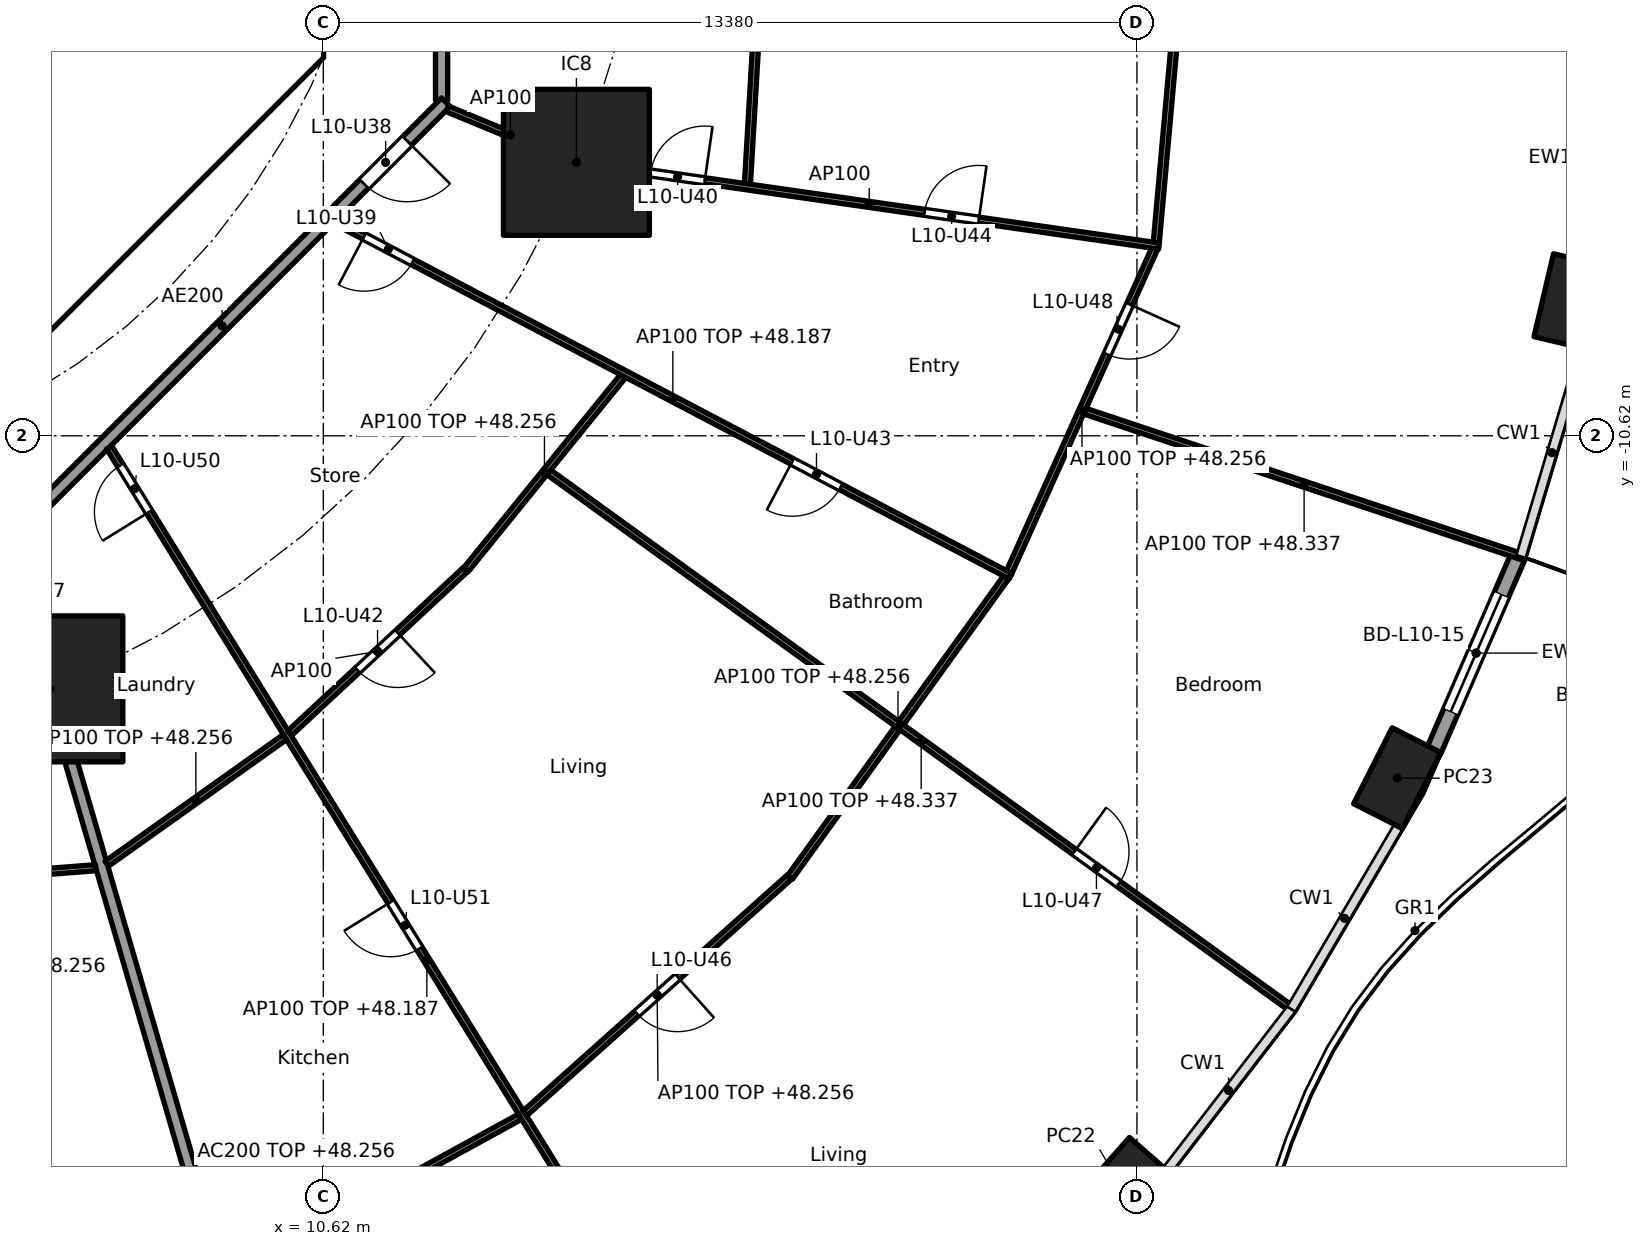
"""IFC4 building model, lengths in metres.
Left out: names, types, materials, properties, quantities, classifications, styles, units other than length and angle.
Written with IfcOpenShell. Run it as: python <this file> out.ifc"""

import sys

from ifc_helpers import new_model, si_unit, direction, frame, frame_2d, origin, origin_2d, place, context, subcontext, project, spatial, polyline, rectangle, hollow_rectangle, outline, extrude, element, fill, save


model = new_model("IFC4")
c1 = context("Model", 3, precision=1e-05, world=origin(), true_north=direction((0.0, 1.0)))
c2 = subcontext(c1, "Body", "Model", "MODEL_VIEW")
j1 = project(units=[si_unit("LENGTHUNIT", "METRE"), si_unit("PLANEANGLEUNIT", "RADIAN")], contexts=[c1])
p1 = place(None, origin())
s1 = spatial("IfcSite", under=j1, at=p1, CompositionType="ELEMENT")
p2 = place(p1, origin())
s2 = spatial("IfcBuilding", under=s1, at=p2, CompositionType="ELEMENT")
p3 = place(p2, frame((0.0, 0.0, 45.5)))
s3 = spatial("IfcBuildingStorey", under=s2, at=p3, CompositionType="ELEMENT", Elevation=45.5)
for number, where, z_axis, x_axis in (
    (1, (23.752, -22.981, 0.0), (0.0, 0.0, 1.0), (0.66, 0.751, 0.0)),
    (2, (28.282, -16.25, 0.0), (0.0, 0.0, 1.0), (0.452, 0.892, 0.0)),
    (3, (31.129, -8.412, 0.0), (0.0, 0.0, 1.0), (0.229, 0.973, 0.0)),
):
    element("IfcColumn", number, at=place(p3, frame(where, z_axis=z_axis, x_axis=x_axis)), inside=s3, PredefinedType="COLUMN", context=c2, shape_type="SweptSolid", body=[
        extrude(hollow_rectangle(XDim=1.4, YDim=0.9, WallThickness=0.05, at=origin_2d()), origin(), (0.0, 0.0, 1.0), 3.7),
    ])
for number, where, z_axis, x_axis in (
    (4, (6.123, -14.782, 0.0), (0.0, 0.0, 1.0), (1.0, 0.0, 0.0)),
    (5, (14.782, -6.123, 0.0), (0.0, 0.0, 1.0), (1.0, 0.0, 0.0)),
):
    element("IfcColumn", number, at=place(p3, frame(where, z_axis=z_axis, x_axis=x_axis)), inside=s3, PredefinedType="COLUMN", context=c2, shape_type="SweptSolid", body=[
        extrude(rectangle(XDim=2.4, YDim=2.4, at=origin_2d()), origin(), (0.0, 0.0, 1.0), 3.7),
    ])
p4 = place(p3, frame((30.278, -12.579, 0.0), z_axis=(0.0, 0.0, 1.0), x_axis=(-0.397624958345, -0.917548032803, 0.0)))
e6 = element("IfcWall", 6, at=p4, inside=s3, PredefinedType="SOLIDWALL", context=c2, shape_type="SweptSolid", body=[
    extrude(rectangle(XDim=3.52, YDim=0.25, at=frame_2d((1.76, 0.0))), origin(), (0.0, 0.0, 1.0), 3.44),
])
p5 = place(p4, frame((0.71, 0.0, 0.0)))
e7 = element("IfcOpeningElement", 7, at=p5, cuts=e6, PredefinedType="OPENING", context=c2, shape_type="SweptSolid", body=[
    extrude(rectangle(XDim=2.1, YDim=2.4, at=frame_2d((1.05, 1.2))), frame((0.0, 0.135, 0.0), z_axis=(0.0, -1.0, 0.0), x_axis=(1.0, 0.0, 0.0)), (0.0, 0.0, 1.0), 0.27),
])
p6 = place(p3, frame((4.613, -9.988, 0.0), z_axis=(0.0, 0.0, 1.0), x_axis=(0.707106781187, 0.707106781187, 0.0)))
e8 = element("IfcWall", 8, at=p6, inside=s3, PredefinedType="SHEAR", context=c2, shape_type="SweptSolid", body=[
    extrude(rectangle(XDim=7.602, YDim=0.6, at=frame_2d((3.801, 0.0))), origin(), (0.0, 0.0, 1.0), 3.44),
])
p7 = place(p6, frame((3.201, 0.0, 0.0)))
e9 = element("IfcOpeningElement", 9, at=p7, cuts=e8, PredefinedType="OPENING", context=c2, shape_type="SweptSolid", body=[
    extrude(rectangle(XDim=1.2, YDim=2.1, at=frame_2d((0.6, 1.05))), frame((0.0, 0.31, 0.0), z_axis=(0.0, -1.0, 0.0), x_axis=(1.0, 0.0, 0.0)), (0.0, 0.0, 1.0), 0.62),
])
p8 = place(p3, origin())
e10 = element("IfcWall", 10, at=p8, inside=s3, PredefinedType="SHEAR", context=c2, shape_type="SweptSolid", body=[
    extrude(outline(polyline([(9.776, -4.401), (10.025, -4.152), (10.025, -3.801), (10.025, 4.152), (9.776, 4.401), (10.2, 4.825), (10.625, 4.401), (10.625, -4.401), (10.2, -4.825), (9.776, -4.401)])), origin(), (0.0, 0.0, 1.0), 3.44),
])
p9 = place(p3, frame((5.243, -12.657, 0.0), z_axis=(0.0, 0.0, 1.0), x_axis=(0.382707856524, -0.923869415315, 0.0)))
e11 = element("IfcWall", 11, at=p9, inside=s3, PredefinedType="PARTITIONING", context=c2, shape_type="SweptSolid", body=[
    extrude(rectangle(XDim=2.2, YDim=0.2, at=frame_2d((1.1, 0.0))), origin(), (0.0, 0.0, 1.0), 3.44),
])
p10 = place(p3, frame((6.137, -14.83, 0.0), z_axis=(0.0, 0.0, 1.0), x_axis=(0.27985745069, -0.960041565399, 0.0)))
e12 = element("IfcWall", 12, at=p10, inside=s3, PredefinedType="PARTITIONING", context=c2, shape_type="SweptSolid", body=[
    extrude(rectangle(XDim=16.705, YDim=0.2, at=frame_2d((8.353, 0.0))), origin(), (0.0, 0.0, 1.0), 2.756),
])
p11 = place(p3, frame((12.565, -5.104, 0.0), z_axis=(0.0, 0.0, 1.0), x_axis=(0.0, 1.0, 0.0)))
e13 = element("IfcWall", 13, at=p11, inside=s3, PredefinedType="PARTITIONING", context=c2, shape_type="SweptSolid", body=[
    extrude(rectangle(XDim=10.209, YDim=0.2, at=frame_2d((5.104, 0.0))), origin(), (0.0, 0.0, 1.0), 3.44),
])
p12 = place(p3, frame((5.275, -12.494, 0.0), z_axis=(0.0, 0.0, 1.0), x_axis=(0.707106781187, 0.707106781187, 0.0)))
e14 = element("IfcWall", 14, at=p12, inside=s3, PredefinedType="PARTITIONING", context=c2, shape_type="SweptSolid", body=[
    extrude(rectangle(XDim=10.409, YDim=0.2, at=frame_2d((5.205, 0.0))), origin(), (0.0, 0.0, 1.0), 3.44),
])
p13 = place(p12, frame((8.508, 0.0, 0.0)))
e15 = element("IfcOpeningElement", 15, at=p13, cuts=e14, PredefinedType="OPENING", context=c2, shape_type="SweptSolid", body=[
    extrude(rectangle(XDim=1.0, YDim=2.1, at=frame_2d((0.5, 1.05))), frame((0.0, 0.11, 0.0), z_axis=(0.0, -1.0, 0.0), x_axis=(1.0, 0.0, 0.0)), (0.0, 0.0, 1.0), 0.22),
])
p14 = place(p3, frame((17.971, -0.05, 0.0), z_axis=(0.0, 0.0, 1.0), x_axis=(-0.058475267553, -0.998288857538, 0.0)))
e16 = element("IfcWall", 16, at=p14, inside=s3, PredefinedType="PARTITIONING", context=c2, shape_type="SweptSolid", body=[
    extrude(rectangle(XDim=6.438, YDim=0.1, at=frame_2d((3.219, 0.0))), origin(), (0.0, 0.0, 1.0), 2.756),
])
p15 = place(p3, frame((24.982, -0.05, 0.0), z_axis=(0.0, 0.0, 1.0), x_axis=(-0.089432471274, -0.995992888068, 0.0)))
e17 = element("IfcWall", 17, at=p15, inside=s3, PredefinedType="PARTITIONING", context=c2, shape_type="SweptSolid", body=[
    extrude(rectangle(XDim=7.423, YDim=0.1, at=frame_2d((3.711, 0.0))), origin(), (0.0, 0.0, 1.0), 2.756),
])
p16 = place(p3, frame((2.288, -18.078, 0.0), z_axis=(0.0, 0.0, 1.0), x_axis=(0.99701850123, 0.077162868047, 0.0)))
e18 = element("IfcWall", 18, at=p16, inside=s3, PredefinedType="PARTITIONING", context=c2, shape_type="SweptSolid", body=[
    extrude(rectangle(XDim=4.604, YDim=0.1, at=frame_2d((2.302, 0.0))), origin(), (0.0, 0.0, 1.0), 2.756),
])
p17 = place(p16, frame((1.852, 0.0, 0.0)))
e19 = element("IfcOpeningElement", 19, at=p17, cuts=e18, PredefinedType="OPENING", context=c2, shape_type="SweptSolid", body=[
    extrude(rectangle(XDim=0.9, YDim=2.1, at=frame_2d((0.45, 1.05))), frame((0.0, 0.06, 0.0), z_axis=(0.0, -1.0, 0.0), x_axis=(1.0, 0.0, 0.0)), (0.0, 0.0, 1.0), 0.12),
])
p18 = place(p3, frame((7.06, -17.657, 0.0), z_axis=(0.0, 0.0, 1.0), x_axis=(0.81492039338, 0.57957290521, 0.0)))
e20 = element("IfcWall", 20, at=p18, inside=s3, PredefinedType="PARTITIONING", context=c2, shape_type="SweptSolid", body=[
    extrude(rectangle(XDim=3.594, YDim=0.1, at=frame_2d((1.797, 0.0))), origin(), (0.0, 0.0, 1.0), 2.756),
])
p19 = place(p3, frame((9.045, -24.456, 0.0), z_axis=(0.0, 0.0, 1.0), x_axis=(0.876809987787, 0.480837025734, 0.0)))
e21 = element("IfcWall", 21, at=p19, inside=s3, PredefinedType="PARTITIONING", context=c2, shape_type="SweptSolid", body=[
    extrude(rectangle(XDim=5.486, YDim=0.1, at=frame_2d((2.743, 0.0))), origin(), (0.0, 0.0, 1.0), 2.756),
])
p20 = place(p3, frame((7.097, -10.81, 0.0), z_axis=(0.0, 0.0, 1.0), x_axis=(0.526453266471, -0.850204068576, 0.0)))
e22 = element("IfcWall", 22, at=p20, inside=s3, PredefinedType="PARTITIONING", context=c2, shape_type="SweptSolid", body=[
    extrude(rectangle(XDim=19.85, YDim=0.1, at=frame_2d((9.925, 0.0))), origin(), (0.0, 0.0, 1.0), 2.687),
])
p21 = place(p20, frame((0.35, 0.0, 0.0)))
e23 = element("IfcOpeningElement", 23, at=p21, cuts=e22, PredefinedType="OPENING", context=c2, shape_type="SweptSolid", body=[
    extrude(rectangle(XDim=0.9, YDim=2.1, at=frame_2d((0.45, 1.05))), frame((0.0, 0.06, 0.0), z_axis=(0.0, -1.0, 0.0), x_axis=(1.0, 0.0, 0.0)), (0.0, 0.0, 1.0), 0.12),
])
p22 = place(p20, frame((8.795, 0.0, 0.0)))
e24 = element("IfcOpeningElement", 24, at=p22, cuts=e22, PredefinedType="OPENING", context=c2, shape_type="SweptSolid", body=[
    extrude(rectangle(XDim=0.9, YDim=2.1, at=frame_2d((0.45, 1.05))), frame((0.0, 0.06, 0.0), z_axis=(0.0, -1.0, 0.0), x_axis=(1.0, 0.0, 0.0)), (0.0, 0.0, 1.0), 0.12),
])
p23 = place(p20, frame((15.935, 0.0, 0.0)))
e25 = element("IfcOpeningElement", 25, at=p23, cuts=e22, PredefinedType="OPENING", context=c2, shape_type="SweptSolid", body=[
    extrude(rectangle(XDim=0.9, YDim=2.1, at=frame_2d((0.45, 1.05))), frame((0.0, 0.06, 0.0), z_axis=(0.0, -1.0, 0.0), x_axis=(1.0, 0.0, 0.0)), (0.0, 0.0, 1.0), 0.12),
])
p24 = place(p3, frame((10.066, -15.511, 0.0), z_axis=(0.0, 0.0, 1.0), x_axis=(0.732022571638, 0.681280378855, 0.0)))
e26 = element("IfcWall", 26, at=p24, inside=s3, PredefinedType="PARTITIONING", context=c2, shape_type="SweptSolid", body=[
    extrude(rectangle(XDim=3.95, YDim=0.1, at=frame_2d((1.975, 0.0))), origin(), (0.0, 0.0, 1.0), 3.44),
])
p25 = place(p24, frame((1.525, 0.0, 0.0)))
e27 = element("IfcOpeningElement", 27, at=p25, cuts=e26, PredefinedType="OPENING", context=c2, shape_type="SweptSolid", body=[
    extrude(rectangle(XDim=0.9, YDim=2.1, at=frame_2d((0.45, 1.05))), frame((0.0, 0.06, 0.0), z_axis=(0.0, -1.0, 0.0), x_axis=(1.0, 0.0, 0.0)), (0.0, 0.0, 1.0), 0.12),
])
p26 = place(p3, frame((13.936, -21.761, 0.0), z_axis=(0.0, 0.0, 1.0), x_axis=(0.745806142791, 0.666163041136, 0.0)))
e28 = element("IfcWall", 28, at=p26, inside=s3, PredefinedType="PARTITIONING", context=c2, shape_type="SweptSolid", body=[
    extrude(rectangle(XDim=5.831, YDim=0.1, at=frame_2d((2.915, 0.0))), origin(), (0.0, 0.0, 1.0), 2.756),
])
p27 = place(p26, frame((2.465, 0.0, 0.0)))
e29 = element("IfcOpeningElement", 29, at=p27, cuts=e28, PredefinedType="OPENING", context=c2, shape_type="SweptSolid", body=[
    extrude(rectangle(XDim=0.9, YDim=2.1, at=frame_2d((0.45, 1.05))), frame((0.0, 0.06, 0.0), z_axis=(0.0, -1.0, 0.0), x_axis=(1.0, 0.0, 0.0)), (0.0, 0.0, 1.0), 0.12),
])
p28 = place(p3, frame((12.963, -12.825, 0.0), z_axis=(0.0, 0.0, 1.0), x_axis=(0.63012473344, 0.776493928056, 0.0)))
e30 = element("IfcWall", 30, at=p28, inside=s3, PredefinedType="PARTITIONING", context=c2, shape_type="SweptSolid", body=[
    extrude(rectangle(XDim=4.106, YDim=0.1, at=frame_2d((2.053, 0.0))), origin(), (0.0, 0.0, 1.0), 2.756),
])
p29 = place(p3, frame((18.293, -17.884, 0.0), z_axis=(0.0, 0.0, 1.0), x_axis=(0.584558392935, 0.811351640936, 0.0)))
e31 = element("IfcWall", 31, at=p29, inside=s3, PredefinedType="PARTITIONING", context=c2, shape_type="SweptSolid", body=[
    extrude(rectangle(XDim=6.084, YDim=0.1, at=frame_2d((3.042, 0.0))), origin(), (0.0, 0.0, 1.0), 2.756),
])
p30 = place(p3, frame((14.329, -11.221, 0.0), z_axis=(0.0, 0.0, 1.0), x_axis=(0.810671130917, -0.58550176558, 0.0)))
e32 = element("IfcWall", 32, at=p30, inside=s3, PredefinedType="PARTITIONING", context=c2, shape_type="SweptSolid", body=[
    extrude(rectangle(XDim=15.106, YDim=0.1, at=frame_2d((7.553, 0.0))), origin(), (0.0, 0.0, 1.0), 2.837),
])
p31 = place(p30, frame((10.659, 0.0, 0.0)))
e33 = element("IfcOpeningElement", 33, at=p31, cuts=e32, PredefinedType="OPENING", context=c2, shape_type="SweptSolid", body=[
    extrude(rectangle(XDim=0.9, YDim=2.1, at=frame_2d((0.45, 1.05))), frame((0.0, 0.06, 0.0), z_axis=(0.0, -1.0, 0.0), x_axis=(1.0, 0.0, 0.0)), (0.0, 0.0, 1.0), 0.12),
])
p32 = place(p3, frame((10.813, -7.091, 0.0), z_axis=(0.0, 0.0, 1.0), x_axis=(0.885182649479, -0.465243674928, 0.0)))
e34 = element("IfcWall", 34, at=p32, inside=s3, PredefinedType="PARTITIONING", context=c2, shape_type="SweptSolid", body=[
    extrude(rectangle(XDim=12.551, YDim=0.1, at=frame_2d((6.275, 0.0))), origin(), (0.0, 0.0, 1.0), 2.687),
])
p33 = place(p32, frame((0.539, 0.0, 0.0)))
e35 = element("IfcOpeningElement", 35, at=p33, cuts=e34, PredefinedType="OPENING", context=c2, shape_type="SweptSolid", body=[
    extrude(rectangle(XDim=0.9, YDim=2.1, at=frame_2d((0.45, 1.05))), frame((0.0, 0.06, 0.0), z_axis=(0.0, -1.0, 0.0), x_axis=(1.0, 0.0, 0.0)), (0.0, 0.0, 1.0), 0.12),
])
p34 = place(p32, frame((8.494, 0.0, 0.0)))
e36 = element("IfcOpeningElement", 36, at=p34, cuts=e34, PredefinedType="OPENING", context=c2, shape_type="SweptSolid", body=[
    extrude(rectangle(XDim=0.9, YDim=2.1, at=frame_2d((0.45, 1.05))), frame((0.0, 0.06, 0.0), z_axis=(0.0, -1.0, 0.0), x_axis=(1.0, 0.0, 0.0)), (0.0, 0.0, 1.0), 0.12),
])
p35 = place(p3, frame((21.899, -12.861, 0.0), z_axis=(0.0, 0.0, 1.0), x_axis=(0.410197710154, 0.911996622025, 0.0)))
e37 = element("IfcWall", 37, at=p35, inside=s3, PredefinedType="PARTITIONING", context=c2, shape_type="SweptSolid", body=[
    extrude(rectangle(XDim=5.837, YDim=0.1, at=frame_2d((2.918, 0.0))), origin(), (0.0, 0.0, 1.0), 2.756),
])
p36 = place(p35, frame((3.928, 0.0, 0.0)))
e38 = element("IfcOpeningElement", 38, at=p36, cuts=e37, PredefinedType="OPENING", context=c2, shape_type="SweptSolid", body=[
    extrude(rectangle(XDim=0.9, YDim=2.1, at=frame_2d((0.45, 1.05))), frame((0.0, 0.06, 0.0), z_axis=(0.0, -1.0, 0.0), x_axis=(1.0, 0.0, 0.0)), (0.0, 0.0, 1.0), 0.12),
])
p37 = place(p3, frame((23.144, -10.216, 0.0), z_axis=(0.0, 0.0, 1.0), x_axis=(0.948811715359, -0.315842253027, 0.0)))
e39 = element("IfcWall", 39, at=p37, inside=s3, PredefinedType="PARTITIONING", context=c2, shape_type="SweptSolid", body=[
    extrude(rectangle(XDim=7.6, YDim=0.1, at=frame_2d((3.8, 0.0))), origin(), (0.0, 0.0, 1.0), 2.837),
])
p38 = place(p3, frame((12.657, -5.243, 0.0), z_axis=(0.0, 0.0, 1.0), x_axis=(0.923864733477, -0.382719158442, 0.0)))
e40 = element("IfcWall", 40, at=p38, inside=s3, PredefinedType="PARTITIONING", context=c2, shape_type="SweptSolid", body=[
    extrude(rectangle(XDim=2.25, YDim=0.1, at=frame_2d((1.125, 0.0))), origin(), (0.0, 0.0, 1.0), 3.44),
])
p39 = place(p3, frame((14.832, -6.13, 0.0), z_axis=(0.0, 0.0, 1.0), x_axis=(0.989837122016, -0.142205737856, 0.0)))
e41 = element("IfcWall", 41, at=p39, inside=s3, PredefinedType="PARTITIONING", context=c2, shape_type="SweptSolid", body=[
    extrude(rectangle(XDim=9.63, YDim=0.1, at=frame_2d((4.815, 0.0))), origin(), (0.0, 0.0, 1.0), 3.44),
])
p40 = place(p39, frame((1.182, 0.0, 0.0)))
e42 = element("IfcOpeningElement", 42, at=p40, cuts=e41, PredefinedType="OPENING", context=c2, shape_type="SweptSolid", body=[
    extrude(rectangle(XDim=0.9, YDim=2.1, at=frame_2d((0.45, 1.05))), frame((0.0, 0.06, 0.0), z_axis=(0.0, -1.0, 0.0), x_axis=(1.0, 0.0, 0.0)), (0.0, 0.0, 1.0), 0.12),
])
p41 = place(p39, frame((5.734, 0.0, 0.0)))
e43 = element("IfcOpeningElement", 43, at=p41, cuts=e41, PredefinedType="OPENING", context=c2, shape_type="SweptSolid", body=[
    extrude(rectangle(XDim=0.9, YDim=2.1, at=frame_2d((0.45, 1.05))), frame((0.0, 0.06, 0.0), z_axis=(0.0, -1.0, 0.0), x_axis=(1.0, 0.0, 0.0)), (0.0, 0.0, 1.0), 0.12),
])
p42 = place(p5, origin())
e44 = element("IfcDoor", 44, at=p42, inside=s3, OperationType="SLIDING_TO_LEFT", PredefinedType="DOOR", context=c2, shape_type="SweptSolid", body=[
    extrude(rectangle(XDim=2.1, YDim=2.4, at=frame_2d((1.05, 1.2))), frame((0.0, 0.025, 0.0), z_axis=(0.0, -1.0, 0.0), x_axis=(1.0, 0.0, 0.0)), (0.0, 0.0, 1.0), 0.05),
])
fill(e7, e44)
p43 = place(p7, origin())
e45 = element("IfcDoor", 45, at=p43, inside=s3, OperationType="SINGLE_SWING_RIGHT", PredefinedType="DOOR", context=c2, shape_type="SweptSolid", body=[
    extrude(rectangle(XDim=1.2, YDim=2.1, at=frame_2d((0.6, 1.05))), frame((0.0, 0.025, 0.0), z_axis=(0.0, -1.0, 0.0), x_axis=(1.0, 0.0, 0.0)), (0.0, 0.0, 1.0), 0.05),
])
fill(e9, e45)
p44 = place(p13, frame((1.0, 0.0, 0.0), x_axis=(-1.0, 0.0, 0.0)))
e46 = element("IfcDoor", 46, at=p44, inside=s3, OperationType="SINGLE_SWING_LEFT", PredefinedType="DOOR", context=c2, shape_type="SweptSolid", body=[
    extrude(rectangle(XDim=1.0, YDim=2.1, at=frame_2d((0.5, 1.05))), frame((0.0, 0.025, 0.0), z_axis=(0.0, -1.0, 0.0), x_axis=(1.0, 0.0, 0.0)), (0.0, 0.0, 1.0), 0.05),
])
fill(e15, e46)
p45 = place(p33, frame((0.9, 0.0, 0.0), x_axis=(-1.0, 0.0, 0.0)))
e47 = element("IfcDoor", 47, at=p45, inside=s3, OperationType="SINGLE_SWING_RIGHT", PredefinedType="DOOR", context=c2, shape_type="SweptSolid", body=[
    extrude(rectangle(XDim=0.9, YDim=2.1, at=frame_2d((0.45, 1.05))), frame((0.0, 0.025, 0.0), z_axis=(0.0, -1.0, 0.0), x_axis=(1.0, 0.0, 0.0)), (0.0, 0.0, 1.0), 0.05),
])
fill(e35, e47)
p46 = place(p40, origin())
e48 = element("IfcDoor", 48, at=p46, inside=s3, OperationType="SINGLE_SWING_RIGHT", PredefinedType="DOOR", context=c2, shape_type="SweptSolid", body=[
    extrude(rectangle(XDim=0.9, YDim=2.1, at=frame_2d((0.45, 1.05))), frame((0.0, 0.025, 0.0), z_axis=(0.0, -1.0, 0.0), x_axis=(1.0, 0.0, 0.0)), (0.0, 0.0, 1.0), 0.05),
])
fill(e42, e48)
p47 = place(p25, frame((0.9, 0.0, 0.0), x_axis=(-1.0, 0.0, 0.0)))
e49 = element("IfcDoor", 49, at=p47, inside=s3, OperationType="SINGLE_SWING_LEFT", PredefinedType="DOOR", context=c2, shape_type="SweptSolid", body=[
    extrude(rectangle(XDim=0.9, YDim=2.1, at=frame_2d((0.45, 1.05))), frame((0.0, 0.025, 0.0), z_axis=(0.0, -1.0, 0.0), x_axis=(1.0, 0.0, 0.0)), (0.0, 0.0, 1.0), 0.05),
])
fill(e27, e49)
p48 = place(p34, frame((0.9, 0.0, 0.0), x_axis=(-1.0, 0.0, 0.0)))
e50 = element("IfcDoor", 50, at=p48, inside=s3, OperationType="SINGLE_SWING_RIGHT", PredefinedType="DOOR", context=c2, shape_type="SweptSolid", body=[
    extrude(rectangle(XDim=0.9, YDim=2.1, at=frame_2d((0.45, 1.05))), frame((0.0, 0.025, 0.0), z_axis=(0.0, -1.0, 0.0), x_axis=(1.0, 0.0, 0.0)), (0.0, 0.0, 1.0), 0.05),
])
fill(e36, e50)
p49 = place(p41, origin())
e51 = element("IfcDoor", 51, at=p49, inside=s3, OperationType="SINGLE_SWING_RIGHT", PredefinedType="DOOR", context=c2, shape_type="SweptSolid", body=[
    extrude(rectangle(XDim=0.9, YDim=2.1, at=frame_2d((0.45, 1.05))), frame((0.0, 0.025, 0.0), z_axis=(0.0, -1.0, 0.0), x_axis=(1.0, 0.0, 0.0)), (0.0, 0.0, 1.0), 0.05),
])
fill(e43, e51)
p50 = place(p27, frame((0.9, 0.0, 0.0), x_axis=(-1.0, 0.0, 0.0)))
e52 = element("IfcDoor", 52, at=p50, inside=s3, OperationType="SINGLE_SWING_LEFT", PredefinedType="DOOR", context=c2, shape_type="SweptSolid", body=[
    extrude(rectangle(XDim=0.9, YDim=2.1, at=frame_2d((0.45, 1.05))), frame((0.0, 0.025, 0.0), z_axis=(0.0, -1.0, 0.0), x_axis=(1.0, 0.0, 0.0)), (0.0, 0.0, 1.0), 0.05),
])
fill(e29, e52)
p51 = place(p31, origin())
e53 = element("IfcDoor", 53, at=p51, inside=s3, OperationType="SINGLE_SWING_LEFT", PredefinedType="DOOR", context=c2, shape_type="SweptSolid", body=[
    extrude(rectangle(XDim=0.9, YDim=2.1, at=frame_2d((0.45, 1.05))), frame((0.0, 0.025, 0.0), z_axis=(0.0, -1.0, 0.0), x_axis=(1.0, 0.0, 0.0)), (0.0, 0.0, 1.0), 0.05),
])
fill(e33, e53)
p52 = place(p36, frame((0.9, 0.0, 0.0), x_axis=(-1.0, 0.0, 0.0)))
e54 = element("IfcDoor", 54, at=p52, inside=s3, OperationType="SINGLE_SWING_LEFT", PredefinedType="DOOR", context=c2, shape_type="SweptSolid", body=[
    extrude(rectangle(XDim=0.9, YDim=2.1, at=frame_2d((0.45, 1.05))), frame((0.0, 0.025, 0.0), z_axis=(0.0, -1.0, 0.0), x_axis=(1.0, 0.0, 0.0)), (0.0, 0.0, 1.0), 0.05),
])
fill(e38, e54)
p53 = place(p21, frame((0.9, 0.0, 0.0), x_axis=(-1.0, 0.0, 0.0)))
e55 = element("IfcDoor", 55, at=p53, inside=s3, OperationType="SINGLE_SWING_LEFT", PredefinedType="DOOR", context=c2, shape_type="SweptSolid", body=[
    extrude(rectangle(XDim=0.9, YDim=2.1, at=frame_2d((0.45, 1.05))), frame((0.0, 0.025, 0.0), z_axis=(0.0, -1.0, 0.0), x_axis=(1.0, 0.0, 0.0)), (0.0, 0.0, 1.0), 0.05),
])
fill(e23, e55)
p54 = place(p22, frame((0.9, 0.0, 0.0), x_axis=(-1.0, 0.0, 0.0)))
e56 = element("IfcDoor", 56, at=p54, inside=s3, OperationType="SINGLE_SWING_RIGHT", PredefinedType="DOOR", context=c2, shape_type="SweptSolid", body=[
    extrude(rectangle(XDim=0.9, YDim=2.1, at=frame_2d((0.45, 1.05))), frame((0.0, 0.025, 0.0), z_axis=(0.0, -1.0, 0.0), x_axis=(1.0, 0.0, 0.0)), (0.0, 0.0, 1.0), 0.05),
])
fill(e24, e56)
save(model, sys.argv[1])
